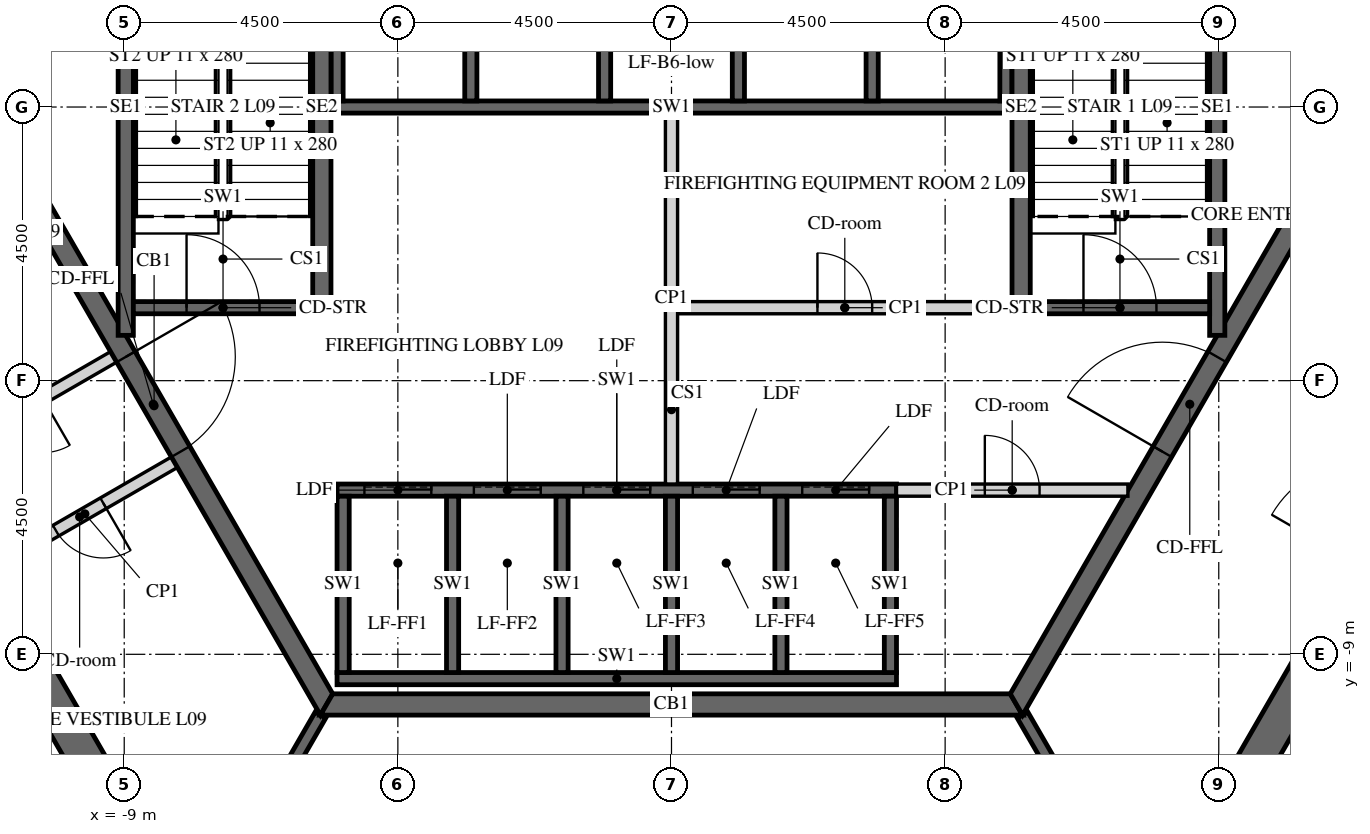
"""IFC4 building model, lengths in metres.
Left out: names, types, materials, properties, quantities, classifications, styles, units other than length and angle.
Written with IfcOpenShell. Run it as: python <this file> out.ifc"""

import sys

from ifc_helpers import new_model, si_unit, direction, frame, frame_2d, origin, place, context, subcontext, project, spatial, polyline, rectangle, outline, extrude, element, fill, save


model = new_model("IFC4")
c1 = context("Model", 3, precision=1e-05, world=origin(), true_north=direction((0.0, 1.0)))
c2 = subcontext(c1, "Body", "Model", "MODEL_VIEW")
j1 = project(units=[si_unit("LENGTHUNIT", "METRE"), si_unit("PLANEANGLEUNIT", "RADIAN")], contexts=[c1])
p1 = place(None, origin())
s1 = spatial("IfcSite", under=j1, at=p1, CompositionType="ELEMENT")
p2 = place(p1, origin())
s2 = spatial("IfcBuilding", under=s1, at=p2, CompositionType="ELEMENT")
p3 = place(p2, frame((0.0, 0.0, 49.2)))
s3 = spatial("IfcBuildingStorey", under=s2, at=p3, CompositionType="ELEMENT", Elevation=49.2)
p4 = place(p3, frame((-7.91, 13.7, -0.15), z_axis=(0.0, 0.0, 1.0), x_axis=(-0.499999880136, -0.866025472988, 0.0)))
e1 = element("IfcWall", 1, at=p4, inside=s3, PredefinedType="SHEAR", context=c2, shape_type="SweptSolid", body=[
    extrude(outline(polyline([(-0.173, -0.3), (15.993, -0.3), (15.646, 0.3), (0.173, 0.3), (-0.173, -0.3)])), origin(), (0.0, 0.0, 1.0), 3.9),
])
p5 = place(p4, frame((7.039, 0.0, 0.15)))
e2 = element("IfcOpeningElement", 2, at=p5, cuts=e1, PredefinedType="OPENING", context=c2, shape_type="SweptSolid", body=[
    extrude(rectangle(XDim=1.8, YDim=2.4, at=frame_2d((0.9, 1.2))), frame((0.0, 0.31, 0.0), z_axis=(0.0, -1.0, 0.0), x_axis=(1.0, 0.0, 0.0)), (0.0, 0.0, 1.0), 0.62),
])
p6 = place(p3, frame((-15.819, 0.0, -0.15), z_axis=(0.0, 0.0, 1.0), x_axis=(0.499999880136, -0.866025472988, 0.0)))
e3 = element("IfcWall", 3, at=p6, inside=s3, PredefinedType="SHEAR", context=c2, shape_type="SweptSolid", body=[
    extrude(outline(polyline([(-0.173, -0.3), (15.993, -0.3), (15.646, 0.3), (0.173, 0.3), (-0.173, -0.3)])), origin(), (0.0, 0.0, 1.0), 3.9),
])
p7 = place(p6, frame((6.981, 0.0, 0.15)))
e4 = element("IfcOpeningElement", 4, at=p7, cuts=e3, PredefinedType="OPENING", context=c2, shape_type="SweptSolid", body=[
    extrude(rectangle(XDim=1.8, YDim=2.4, at=frame_2d((0.9, 1.2))), frame((0.0, 0.31, 0.0), z_axis=(0.0, -1.0, 0.0), x_axis=(1.0, 0.0, 0.0)), (0.0, 0.0, 1.0), 0.62),
])
p8 = place(p3, frame((7.91, -13.7, -0.15), z_axis=(0.0, 0.0, 1.0), x_axis=(0.499999880136, 0.866025472988, 0.0)))
e5 = element("IfcWall", 5, at=p8, inside=s3, PredefinedType="SHEAR", context=c2, shape_type="SweptSolid", body=[
    extrude(outline(polyline([(-0.173, -0.3), (15.993, -0.3), (15.646, 0.3), (0.173, 0.3), (-0.173, -0.3)])), origin(), (0.0, 0.0, 1.0), 3.9),
])
p9 = place(p8, frame((7.039, 0.0, 0.15)))
e6 = element("IfcOpeningElement", 6, at=p9, cuts=e5, PredefinedType="OPENING", context=c2, shape_type="SweptSolid", body=[
    extrude(rectangle(XDim=1.8, YDim=2.4, at=frame_2d((0.9, 1.2))), frame((0.0, 0.31, 0.0), z_axis=(0.0, -1.0, 0.0), x_axis=(1.0, 0.0, 0.0)), (0.0, 0.0, 1.0), 0.62),
])
p10 = place(p3, frame((15.819, 0.0, -0.15), z_axis=(0.0, 0.0, 1.0), x_axis=(-0.499999880136, 0.866025472988, 0.0)))
e7 = element("IfcWall", 7, at=p10, inside=s3, PredefinedType="SHEAR", context=c2, shape_type="SweptSolid", body=[
    extrude(outline(polyline([(-0.173, -0.3), (15.993, -0.3), (15.646, 0.3), (0.173, 0.3), (-0.173, -0.3)])), origin(), (0.0, 0.0, 1.0), 3.9),
])
p11 = place(p10, frame((6.981, 0.0, 0.15)))
e8 = element("IfcOpeningElement", 8, at=p11, cuts=e7, PredefinedType="OPENING", context=c2, shape_type="SweptSolid", body=[
    extrude(rectangle(XDim=1.8, YDim=2.4, at=frame_2d((0.9, 1.2))), frame((0.0, 0.31, 0.0), z_axis=(0.0, -1.0, 0.0), x_axis=(1.0, 0.0, 0.0)), (0.0, 0.0, 1.0), 0.62),
])
p12 = place(p3, frame((-5.673, 9.825, -0.15), z_axis=(0.0, 0.0, 1.0), x_axis=(-0.499995046907, -0.866028263435, 0.0)))
e9 = element("IfcWall", 9, at=p12, inside=s3, PredefinedType="SHEAR", context=c2, shape_type="SweptSolid", body=[
    extrude(outline(polyline([(-0.101, -0.175), (11.446, -0.175), (11.244, 0.175), (0.101, 0.175), (-0.101, -0.175)])), origin(), (0.0, 0.0, 1.0), 3.9),
])
p13 = place(p12, frame((4.801, 0.0, 0.15)))
e10 = element("IfcOpeningElement", 10, at=p13, cuts=e9, PredefinedType="OPENING", context=c2, shape_type="SweptSolid", body=[
    extrude(rectangle(XDim=1.8, YDim=2.4, at=frame_2d((0.9, 1.2))), frame((0.0, 0.185, 0.0), z_axis=(0.0, -1.0, 0.0), x_axis=(1.0, 0.0, 0.0)), (0.0, 0.0, 1.0), 0.37),
])
p14 = place(p3, frame((-11.345, 0.0, -0.15), z_axis=(0.0, 0.0, 1.0), x_axis=(0.499995046907, -0.866028263435, 0.0)))
e11 = element("IfcWall", 11, at=p14, inside=s3, PredefinedType="SHEAR", context=c2, shape_type="SweptSolid", body=[
    extrude(outline(polyline([(-0.101, -0.175), (11.446, -0.175), (11.244, 0.175), (0.101, 0.175), (-0.101, -0.175)])), origin(), (0.0, 0.0, 1.0), 3.9),
])
p15 = place(p14, frame((4.744, 0.0, 0.15)))
e12 = element("IfcOpeningElement", 12, at=p15, cuts=e11, PredefinedType="OPENING", context=c2, shape_type="SweptSolid", body=[
    extrude(rectangle(XDim=1.8, YDim=2.4, at=frame_2d((0.9, 1.2))), frame((0.0, 0.185, 0.0), z_axis=(0.0, -1.0, 0.0), x_axis=(1.0, 0.0, 0.0)), (0.0, 0.0, 1.0), 0.37),
])
p16 = place(p3, frame((-5.673, -9.825, -0.15), z_axis=(0.0, 0.0, 1.0), x_axis=(1.0, 0.0, 0.0)))
e13 = element("IfcWall", 13, at=p16, inside=s3, PredefinedType="SHEAR", context=c2, shape_type="SweptSolid", body=[
    extrude(outline(polyline([(-0.101, -0.175), (11.446, -0.175), (11.244, 0.175), (0.101, 0.175), (-0.101, -0.175)])), origin(), (0.0, 0.0, 1.0), 3.9),
])
p17 = place(p3, frame((5.673, -9.825, -0.15), z_axis=(0.0, 0.0, 1.0), x_axis=(0.499995046907, 0.866028263435, 0.0)))
e14 = element("IfcWall", 14, at=p17, inside=s3, PredefinedType="SHEAR", context=c2, shape_type="SweptSolid", body=[
    extrude(outline(polyline([(-0.101, -0.175), (11.446, -0.175), (11.244, 0.175), (0.101, 0.175), (-0.101, -0.175)])), origin(), (0.0, 0.0, 1.0), 3.9),
])
p18 = place(p17, frame((4.801, 0.0, 0.15)))
e15 = element("IfcOpeningElement", 15, at=p18, cuts=e14, PredefinedType="OPENING", context=c2, shape_type="SweptSolid", body=[
    extrude(rectangle(XDim=1.8, YDim=2.4, at=frame_2d((0.9, 1.2))), frame((0.0, 0.185, 0.0), z_axis=(0.0, -1.0, 0.0), x_axis=(1.0, 0.0, 0.0)), (0.0, 0.0, 1.0), 0.37),
])
p19 = place(p3, frame((11.345, 0.0, -0.15), z_axis=(0.0, 0.0, 1.0), x_axis=(-0.499995046907, 0.866028263435, 0.0)))
e16 = element("IfcWall", 16, at=p19, inside=s3, PredefinedType="SHEAR", context=c2, shape_type="SweptSolid", body=[
    extrude(outline(polyline([(-0.101, -0.175), (11.446, -0.175), (11.244, 0.175), (0.101, 0.175), (-0.101, -0.175)])), origin(), (0.0, 0.0, 1.0), 3.9),
])
p20 = place(p19, frame((4.744, 0.0, 0.15)))
e17 = element("IfcOpeningElement", 17, at=p20, cuts=e16, PredefinedType="OPENING", context=c2, shape_type="SweptSolid", body=[
    extrude(rectangle(XDim=1.8, YDim=2.4, at=frame_2d((0.9, 1.2))), frame((0.0, 0.185, 0.0), z_axis=(0.0, -1.0, 0.0), x_axis=(1.0, 0.0, 0.0)), (0.0, 0.0, 1.0), 0.37),
])
p21 = place(p3, frame((-5.6, 0.0, -0.25), z_axis=(0.0, 0.0, 1.0), x_axis=(1.0, 0.0, 0.0)))
e18 = element("IfcWall", 18, at=p21, inside=s3, PredefinedType="SHEAR", context=c2, shape_type="SweptSolid", body=[
    extrude(rectangle(XDim=11.2, YDim=0.2, at=frame_2d((5.6, 0.0))), origin(), (0.0, 0.0, 1.0), 3.9),
])
for number, where, z_axis, x_axis in (
    (19, (-5.5, 0.1, -0.25), (0.0, 0.0, 1.0), (0.0, 1.0, 0.0)),
    (20, (-3.3, 0.1, -0.25), (0.0, 0.0, 1.0), (0.0, 1.0, 0.0)),
    (21, (-1.1, 0.1, -0.25), (0.0, 0.0, 1.0), (0.0, 1.0, 0.0)),
    (22, (1.1, 0.1, -0.25), (0.0, 0.0, 1.0), (0.0, 1.0, 0.0)),
    (23, (3.3, 0.1, -0.25), (0.0, 0.0, 1.0), (0.0, 1.0, 0.0)),
    (24, (5.5, 0.1, -0.25), (0.0, 0.0, 1.0), (0.0, 1.0, 0.0)),
):
    element("IfcWall", number, at=place(p3, frame(where, z_axis=z_axis, x_axis=x_axis)), inside=s3, PredefinedType="SHEAR", context=c2, shape_type="SweptSolid", body=[
        extrude(rectangle(XDim=3.1, YDim=0.2, at=frame_2d((1.55, 0.0))), origin(), (0.0, 0.0, 1.0), 3.9),
    ])
p22 = place(p3, frame((-5.5, -6.3, -0.25), z_axis=(0.0, 0.0, 1.0), x_axis=(1.0, 0.0, 0.0)))
e25 = element("IfcWall", 25, at=p22, inside=s3, PredefinedType="SHEAR", context=c2, shape_type="SweptSolid", body=[
    extrude(rectangle(XDim=9.2, YDim=0.2, at=frame_2d((4.6, 0.0))), origin(), (0.0, 0.0, 1.0), 3.9),
])
p23 = place(p22, frame((0.45, 0.0, 0.25)))
e26 = element("IfcOpeningElement", 26, at=p23, cuts=e25, PredefinedType="OPENING", context=c2, shape_type="SweptSolid", body=[
    extrude(rectangle(XDim=1.1, YDim=2.1, at=frame_2d((0.55, 1.05))), frame((0.0, 0.11, 0.0), z_axis=(0.0, -1.0, 0.0), x_axis=(1.0, 0.0, 0.0)), (0.0, 0.0, 1.0), 0.22),
])
p24 = place(p22, frame((2.25, 0.0, 0.25)))
e27 = element("IfcOpeningElement", 27, at=p24, cuts=e25, PredefinedType="OPENING", context=c2, shape_type="SweptSolid", body=[
    extrude(rectangle(XDim=1.1, YDim=2.1, at=frame_2d((0.55, 1.05))), frame((0.0, 0.11, 0.0), z_axis=(0.0, -1.0, 0.0), x_axis=(1.0, 0.0, 0.0)), (0.0, 0.0, 1.0), 0.22),
])
p25 = place(p22, frame((4.05, 0.0, 0.25)))
e28 = element("IfcOpeningElement", 28, at=p25, cuts=e25, PredefinedType="OPENING", context=c2, shape_type="SweptSolid", body=[
    extrude(rectangle(XDim=1.1, YDim=2.1, at=frame_2d((0.55, 1.05))), frame((0.0, 0.11, 0.0), z_axis=(0.0, -1.0, 0.0), x_axis=(1.0, 0.0, 0.0)), (0.0, 0.0, 1.0), 0.22),
])
p26 = place(p22, frame((5.85, 0.0, 0.25)))
e29 = element("IfcOpeningElement", 29, at=p26, cuts=e25, PredefinedType="OPENING", context=c2, shape_type="SweptSolid", body=[
    extrude(rectangle(XDim=1.1, YDim=2.1, at=frame_2d((0.55, 1.05))), frame((0.0, 0.11, 0.0), z_axis=(0.0, -1.0, 0.0), x_axis=(1.0, 0.0, 0.0)), (0.0, 0.0, 1.0), 0.22),
])
p27 = place(p22, frame((7.65, 0.0, 0.25)))
e30 = element("IfcOpeningElement", 30, at=p27, cuts=e25, PredefinedType="OPENING", context=c2, shape_type="SweptSolid", body=[
    extrude(rectangle(XDim=1.1, YDim=2.1, at=frame_2d((0.55, 1.05))), frame((0.0, 0.11, 0.0), z_axis=(0.0, -1.0, 0.0), x_axis=(1.0, 0.0, 0.0)), (0.0, 0.0, 1.0), 0.22),
])
p28 = place(p3, frame((-5.5, -9.4, -0.25), z_axis=(0.0, 0.0, 1.0), x_axis=(1.0, 0.0, 0.0)))
e31 = element("IfcWall", 31, at=p28, inside=s3, PredefinedType="SHEAR", context=c2, shape_type="SweptSolid", body=[
    extrude(rectangle(XDim=9.2, YDim=0.2, at=frame_2d((4.6, 0.0))), origin(), (0.0, 0.0, 1.0), 3.9),
])
for number, where, z_axis, x_axis in (
    (32, (-5.4, -9.3, -0.25), (0.0, 0.0, 1.0), (0.0, 1.0, 0.0)),
    (33, (-3.6, -9.3, -0.25), (0.0, 0.0, 1.0), (0.0, 1.0, 0.0)),
    (34, (-1.8, -9.3, -0.25), (0.0, 0.0, 1.0), (0.0, 1.0, 0.0)),
    (35, (0.0, -9.3, -0.25), (0.0, 0.0, 1.0), (0.0, 1.0, 0.0)),
    (36, (1.8, -9.3, -0.25), (0.0, 0.0, 1.0), (0.0, 1.0, 0.0)),
    (37, (3.6, -9.3, -0.25), (0.0, 0.0, 1.0), (0.0, 1.0, 0.0)),
):
    element("IfcWall", number, at=place(p3, frame(where, z_axis=z_axis, x_axis=x_axis)), inside=s3, PredefinedType="SHEAR", context=c2, shape_type="SweptSolid", body=[
        extrude(rectangle(XDim=2.9, YDim=0.2, at=frame_2d((1.45, 0.0))), origin(), (0.0, 0.0, 1.0), 3.9),
    ])
p29 = place(p3, frame((0.1, -3.3, 0.0), z_axis=(0.0, 0.0, 1.0), x_axis=(1.0, 0.0, 0.0)))
e38 = element("IfcWall", 38, at=p29, inside=s3, PredefinedType="PARTITIONING", context=c2, shape_type="SweptSolid", body=[
    extrude(rectangle(XDim=5.5, YDim=0.2, at=frame_2d((2.75, 0.0))), origin(), (0.0, 0.0, 1.0), 3.65),
])
p30 = place(p29, frame((2.3, 0.0, 0.0)))
e39 = element("IfcOpeningElement", 39, at=p30, cuts=e38, PredefinedType="OPENING", context=c2, shape_type="SweptSolid", body=[
    extrude(rectangle(XDim=0.9, YDim=2.1, at=frame_2d((0.45, 1.05))), frame((0.0, 0.11, 0.0), z_axis=(0.0, -1.0, 0.0), x_axis=(1.0, 0.0, 0.0)), (0.0, 0.0, 1.0), 0.22),
])
p31 = place(p3, frame((0.0, -6.2, 0.0), z_axis=(0.0, 0.0, 1.0), x_axis=(0.0, 1.0, 0.0)))
e40 = element("IfcWall", 40, at=p31, inside=s3, PredefinedType="PARTITIONING", context=c2, shape_type="SweptSolid", body=[
    extrude(rectangle(XDim=6.1, YDim=0.2, at=frame_2d((3.05, 0.0))), origin(), (0.0, 0.0, 1.0), 3.65),
])
p32 = place(p3, frame((3.7, -6.3, 0.0), z_axis=(0.0, 0.0, 1.0), x_axis=(1.0, 0.0, 0.0)))
e41 = element("IfcWall", 41, at=p32, inside=s3, PredefinedType="PARTITIONING", context=c2, shape_type="SweptSolid", body=[
    extrude(rectangle(XDim=3.806, YDim=0.2, at=frame_2d((1.903, 0.0))), origin(), (0.0, 0.0, 1.0), 3.65),
])
p33 = place(p32, frame((1.453, 0.0, 0.0)))
e42 = element("IfcOpeningElement", 42, at=p33, cuts=e41, PredefinedType="OPENING", context=c2, shape_type="SweptSolid", body=[
    extrude(rectangle(XDim=0.9, YDim=2.1, at=frame_2d((0.45, 1.05))), frame((0.0, 0.11, 0.0), z_axis=(0.0, -1.0, 0.0), x_axis=(1.0, 0.0, 0.0)), (0.0, 0.0, 1.0), 0.22),
])
for number, where, z_axis, x_axis in (
    (43, (-5.773, -10.0, -0.15), (0.0, 0.0, 1.0), (-0.5, -0.866, 0.0)),
    (44, (5.773, -10.0, -0.15), (0.0, 0.0, 1.0), (0.5, -0.866, 0.0)),
):
    element("IfcWall", number, at=place(p3, frame(where, z_axis=z_axis, x_axis=x_axis)), inside=s3, PredefinedType="SHEAR", context=c2, shape_type="SweptSolid", body=[
        extrude(rectangle(XDim=3.926, YDim=0.2, at=frame_2d((1.963, 0.0))), origin(), (0.0, 0.0, 1.0), 3.9),
    ])
p34 = place(p3, frame((-8.175, -5.841, 0.0), z_axis=(0.0, 0.0, 1.0), x_axis=(-0.866020560687, -0.500008388397, 0.0)))
e45 = element("IfcWall", 45, at=p34, inside=s3, PredefinedType="PARTITIONING", context=c2, shape_type="SweptSolid", body=[
    extrude(rectangle(XDim=3.4, YDim=0.2, at=frame_2d((1.7, 0.0))), origin(), (0.0, 0.0, 1.0), 3.65),
])
p35 = place(p34, frame((1.35, 0.0, 0.0)))
e46 = element("IfcOpeningElement", 46, at=p35, cuts=e45, PredefinedType="OPENING", context=c2, shape_type="SweptSolid", body=[
    extrude(rectangle(XDim=0.9, YDim=2.1, at=frame_2d((0.45, 1.05))), frame((0.0, 0.11, 0.0), z_axis=(0.0, -1.0, 0.0), x_axis=(1.0, 0.0, 0.0)), (0.0, 0.0, 1.0), 0.22),
])
p36 = place(p3, frame((-9.175, -4.109, 0.0), z_axis=(0.0, 0.0, 1.0), x_axis=(-0.865989465428, -0.500062241894, 0.0)))
e47 = element("IfcWall", 47, at=p36, inside=s3, PredefinedType="PARTITIONING", context=c2, shape_type="SweptSolid", body=[
    extrude(rectangle(XDim=3.4, YDim=0.2, at=frame_2d((1.7, 0.0))), origin(), (0.0, 0.0, 1.0), 3.65),
])
p37 = place(p36, frame((1.351, 0.0, 0.0)))
e48 = element("IfcOpeningElement", 48, at=p37, cuts=e47, PredefinedType="OPENING", context=c2, shape_type="SweptSolid", body=[
    extrude(rectangle(XDim=0.9, YDim=2.1, at=frame_2d((0.45, 1.05))), frame((0.0, 0.11, 0.0), z_axis=(0.0, -1.0, 0.0), x_axis=(1.0, 0.0, 0.0)), (0.0, 0.0, 1.0), 0.22),
])
p38 = place(p3, frame((5.75, -3.4, -0.25), z_axis=(0.0, 0.0, 1.0), x_axis=(0.0, 1.0, 0.0)))
e49 = element("IfcWall", 49, at=p38, inside=s3, PredefinedType="SHEAR", context=c2, shape_type="SweptSolid", body=[
    extrude(rectangle(XDim=6.8, YDim=0.3, at=frame_2d((3.4, 0.0))), origin(), (0.0, 0.0, 1.0), 3.9),
])
p39 = place(p3, frame((8.975, -3.755, -0.25), z_axis=(0.0, 0.0, 1.0), x_axis=(0.0, 1.0, 0.0)))
e50 = element("IfcWall", 50, at=p39, inside=s3, PredefinedType="SHEAR", context=c2, shape_type="SweptSolid", body=[
    extrude(rectangle(XDim=7.51, YDim=0.25, at=frame_2d((3.755, 0.0))), origin(), (0.0, 0.0, 1.0), 3.9),
])
p40 = place(p3, frame((5.9, -3.3, -0.25), z_axis=(0.0, 0.0, 1.0), x_axis=(1.0, 0.0, 0.0)))
e51 = element("IfcWall", 51, at=p40, inside=s3, PredefinedType="SHEAR", context=c2, shape_type="SweptSolid", body=[
    extrude(rectangle(XDim=2.95, YDim=0.2, at=frame_2d((1.475, 0.0))), origin(), (0.0, 0.0, 1.0), 3.9),
])
p41 = place(p40, frame((0.875, 0.0, 0.25)))
e52 = element("IfcOpeningElement", 52, at=p41, cuts=e51, PredefinedType="OPENING", context=c2, shape_type="SweptSolid", body=[
    extrude(rectangle(XDim=1.2, YDim=2.4, at=frame_2d((0.6, 1.2))), frame((0.0, 0.11, 0.0), z_axis=(0.0, -1.0, 0.0), x_axis=(1.0, 0.0, 0.0)), (0.0, 0.0, 1.0), 0.22),
])
p42 = place(p3, frame((-5.75, -3.4, -0.25), z_axis=(0.0, 0.0, 1.0), x_axis=(0.0, 1.0, 0.0)))
e53 = element("IfcWall", 53, at=p42, inside=s3, PredefinedType="SHEAR", context=c2, shape_type="SweptSolid", body=[
    extrude(rectangle(XDim=6.8, YDim=0.3, at=frame_2d((3.4, 0.0))), origin(), (0.0, 0.0, 1.0), 3.9),
])
p43 = place(p3, frame((-8.975, -3.755, -0.25), z_axis=(0.0, 0.0, 1.0), x_axis=(0.0, 1.0, 0.0)))
e54 = element("IfcWall", 54, at=p43, inside=s3, PredefinedType="SHEAR", context=c2, shape_type="SweptSolid", body=[
    extrude(rectangle(XDim=7.51, YDim=0.25, at=frame_2d((3.755, 0.0))), origin(), (0.0, 0.0, 1.0), 3.9),
])
p44 = place(p3, frame((-8.85, -3.3, -0.25), z_axis=(0.0, 0.0, 1.0), x_axis=(1.0, 0.0, 0.0)))
e55 = element("IfcWall", 55, at=p44, inside=s3, PredefinedType="SHEAR", context=c2, shape_type="SweptSolid", body=[
    extrude(rectangle(XDim=2.95, YDim=0.2, at=frame_2d((1.475, 0.0))), origin(), (0.0, 0.0, 1.0), 3.9),
])
p45 = place(p44, frame((0.875, 0.0, 0.25)))
e56 = element("IfcOpeningElement", 56, at=p45, cuts=e55, PredefinedType="OPENING", context=c2, shape_type="SweptSolid", body=[
    extrude(rectangle(XDim=1.2, YDim=2.4, at=frame_2d((0.6, 1.2))), frame((0.0, 0.11, 0.0), z_axis=(0.0, -1.0, 0.0), x_axis=(1.0, 0.0, 0.0)), (0.0, 0.0, 1.0), 0.22),
])
p46 = place(p15, origin())
e57 = element("IfcDoor", 57, at=p46, inside=s3, OperationType="DOUBLE_DOOR_SINGLE_SWING", PredefinedType="DOOR", context=c2, shape_type="SweptSolid", body=[
    extrude(rectangle(XDim=1.8, YDim=2.4, at=frame_2d((0.9, 1.2))), frame((0.0, 0.025, 0.0), z_axis=(0.0, -1.0, 0.0), x_axis=(1.0, 0.0, 0.0)), (0.0, 0.0, 1.0), 0.05),
])
fill(e12, e57)
p47 = place(p18, origin())
e58 = element("IfcDoor", 58, at=p47, inside=s3, OperationType="DOUBLE_DOOR_SINGLE_SWING", PredefinedType="DOOR", context=c2, shape_type="SweptSolid", body=[
    extrude(rectangle(XDim=1.8, YDim=2.4, at=frame_2d((0.9, 1.2))), frame((0.0, 0.025, 0.0), z_axis=(0.0, -1.0, 0.0), x_axis=(1.0, 0.0, 0.0)), (0.0, 0.0, 1.0), 0.05),
])
fill(e15, e58)
p48 = place(p30, origin())
e59 = element("IfcDoor", 59, at=p48, inside=s3, OperationType="SINGLE_SWING_LEFT", PredefinedType="DOOR", context=c2, shape_type="SweptSolid", body=[
    extrude(rectangle(XDim=0.9, YDim=2.1, at=frame_2d((0.45, 1.05))), frame((0.0, 0.025, 0.0), z_axis=(0.0, -1.0, 0.0), x_axis=(1.0, 0.0, 0.0)), (0.0, 0.0, 1.0), 0.05),
])
fill(e39, e59)
p49 = place(p33, origin())
e60 = element("IfcDoor", 60, at=p49, inside=s3, OperationType="SINGLE_SWING_LEFT", PredefinedType="DOOR", context=c2, shape_type="SweptSolid", body=[
    extrude(rectangle(XDim=0.9, YDim=2.1, at=frame_2d((0.45, 1.05))), frame((0.0, 0.025, 0.0), z_axis=(0.0, -1.0, 0.0), x_axis=(1.0, 0.0, 0.0)), (0.0, 0.0, 1.0), 0.05),
])
fill(e42, e60)
p50 = place(p35, origin())
e61 = element("IfcDoor", 61, at=p50, inside=s3, OperationType="SINGLE_SWING_LEFT", PredefinedType="DOOR", context=c2, shape_type="SweptSolid", body=[
    extrude(rectangle(XDim=0.9, YDim=2.1, at=frame_2d((0.45, 1.05))), frame((0.0, 0.025, 0.0), z_axis=(0.0, -1.0, 0.0), x_axis=(1.0, 0.0, 0.0)), (0.0, 0.0, 1.0), 0.05),
])
fill(e46, e61)
p51 = place(p41, origin())
e62 = element("IfcDoor", 62, at=p51, inside=s3, OperationType="SINGLE_SWING_LEFT", PredefinedType="DOOR", context=c2, shape_type="SweptSolid", body=[
    extrude(rectangle(XDim=1.2, YDim=2.4, at=frame_2d((0.6, 1.2))), frame((0.0, 0.025, 0.0), z_axis=(0.0, -1.0, 0.0), x_axis=(1.0, 0.0, 0.0)), (0.0, 0.0, 1.0), 0.05),
])
fill(e52, e62)
p52 = place(p45, origin())
e63 = element("IfcDoor", 63, at=p52, inside=s3, OperationType="SINGLE_SWING_LEFT", PredefinedType="DOOR", context=c2, shape_type="SweptSolid", body=[
    extrude(rectangle(XDim=1.2, YDim=2.4, at=frame_2d((0.6, 1.2))), frame((0.0, 0.025, 0.0), z_axis=(0.0, -1.0, 0.0), x_axis=(1.0, 0.0, 0.0)), (0.0, 0.0, 1.0), 0.05),
])
fill(e56, e63)
p53 = place(p23, origin())
e64 = element("IfcDoor", 64, at=p53, inside=s3, OperationType="SLIDING_TO_LEFT", PredefinedType="DOOR", context=c2, shape_type="SweptSolid", body=[
    extrude(rectangle(XDim=1.1, YDim=2.1, at=frame_2d((0.55, 1.05))), frame((0.0, 0.025, 0.0), z_axis=(0.0, -1.0, 0.0), x_axis=(1.0, 0.0, 0.0)), (0.0, 0.0, 1.0), 0.05),
])
fill(e26, e64)
p54 = place(p24, origin())
e65 = element("IfcDoor", 65, at=p54, inside=s3, OperationType="SLIDING_TO_LEFT", PredefinedType="DOOR", context=c2, shape_type="SweptSolid", body=[
    extrude(rectangle(XDim=1.1, YDim=2.1, at=frame_2d((0.55, 1.05))), frame((0.0, 0.025, 0.0), z_axis=(0.0, -1.0, 0.0), x_axis=(1.0, 0.0, 0.0)), (0.0, 0.0, 1.0), 0.05),
])
fill(e27, e65)
p55 = place(p25, origin())
e66 = element("IfcDoor", 66, at=p55, inside=s3, OperationType="SLIDING_TO_LEFT", PredefinedType="DOOR", context=c2, shape_type="SweptSolid", body=[
    extrude(rectangle(XDim=1.1, YDim=2.1, at=frame_2d((0.55, 1.05))), frame((0.0, 0.025, 0.0), z_axis=(0.0, -1.0, 0.0), x_axis=(1.0, 0.0, 0.0)), (0.0, 0.0, 1.0), 0.05),
])
fill(e28, e66)
p56 = place(p26, origin())
e67 = element("IfcDoor", 67, at=p56, inside=s3, OperationType="SLIDING_TO_LEFT", PredefinedType="DOOR", context=c2, shape_type="SweptSolid", body=[
    extrude(rectangle(XDim=1.1, YDim=2.1, at=frame_2d((0.55, 1.05))), frame((0.0, 0.025, 0.0), z_axis=(0.0, -1.0, 0.0), x_axis=(1.0, 0.0, 0.0)), (0.0, 0.0, 1.0), 0.05),
])
fill(e29, e67)
p57 = place(p27, origin())
e68 = element("IfcDoor", 68, at=p57, inside=s3, OperationType="SLIDING_TO_LEFT", PredefinedType="DOOR", context=c2, shape_type="SweptSolid", body=[
    extrude(rectangle(XDim=1.1, YDim=2.1, at=frame_2d((0.55, 1.05))), frame((0.0, 0.025, 0.0), z_axis=(0.0, -1.0, 0.0), x_axis=(1.0, 0.0, 0.0)), (0.0, 0.0, 1.0), 0.05),
])
fill(e30, e68)
save(model, sys.argv[1])
